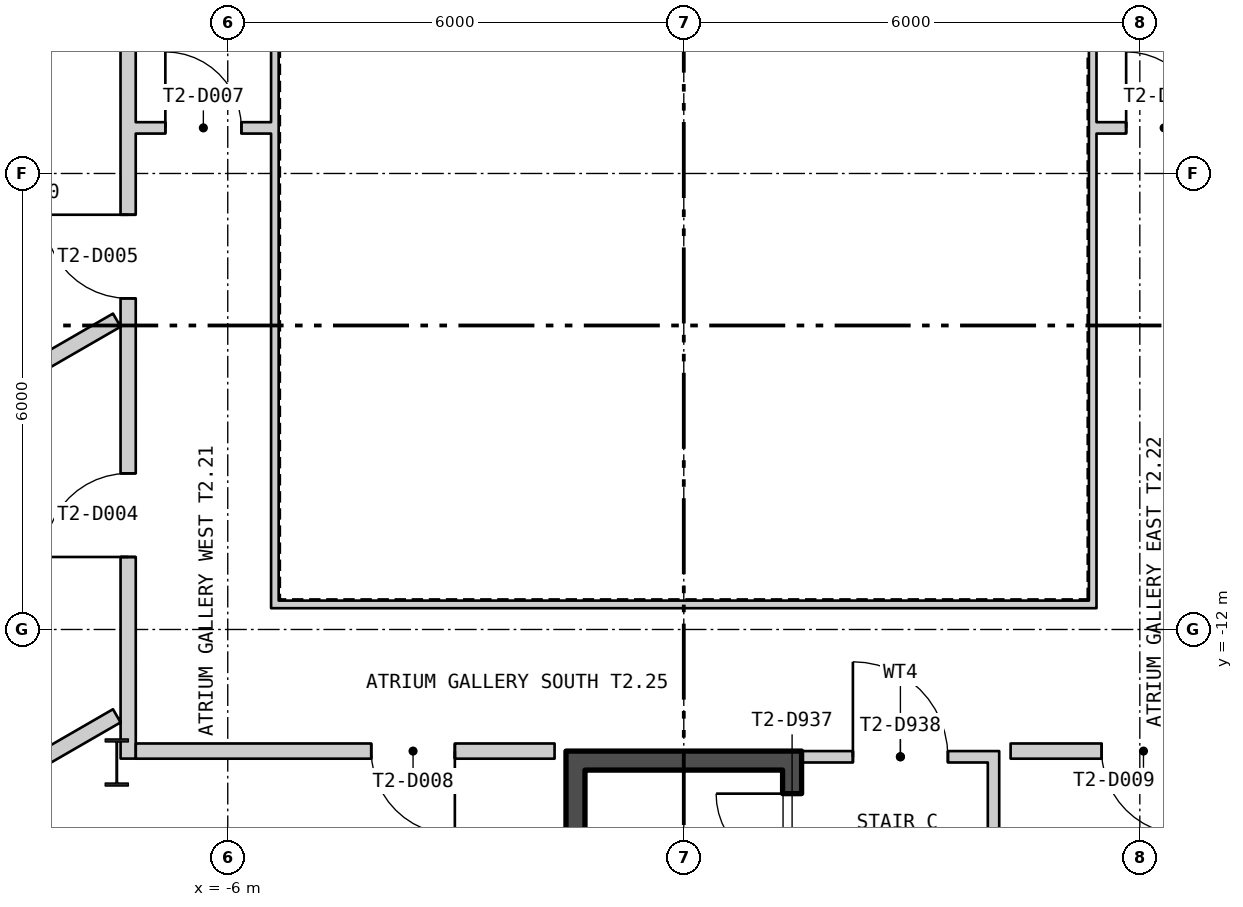
"""IFC4 building model, lengths in metres.
Left out: names, types, materials, properties, quantities, classifications, styles, units other than length and angle.
Written with IfcOpenShell. Run it as: python <this file> out.ifc"""

import sys

from ifc_helpers import new_model, si_unit, direction, frame, frame_2d, origin, origin_2d, place, context, subcontext, project, spatial, polyline, rectangle, i_section, outline, extrude, element, fill, save


model = new_model("IFC4")
c1 = context("Model", 3, precision=1e-05, world=origin(), true_north=direction((0.0, 1.0)))
c2 = subcontext(c1, "Body", "Model", "MODEL_VIEW")
j1 = project(units=[si_unit("LENGTHUNIT", "METRE"), si_unit("PLANEANGLEUNIT", "RADIAN")], contexts=[c1])
p1 = place(None, origin())
s1 = spatial("IfcSite", under=j1, at=p1, CompositionType="ELEMENT")
p2 = place(p1, origin())
s2 = spatial("IfcBuilding", under=s1, at=p2, CompositionType="ELEMENT")
p3 = place(p2, frame((0.0, 0.0, 133.8)))
s3 = spatial("IfcBuildingStorey", under=s2, at=p3, CompositionType="ELEMENT", Elevation=133.8)
p4 = place(p3, frame((-7.46, -13.75, 0.0), z_axis=(0.0, 0.0, 1.0), x_axis=(1.0, 0.0, 0.0)))
e1 = element("IfcColumn", 1, at=p4, inside=s3, PredefinedType="COLUMN", context=c2, shape_type="SweptSolid", body=[
    extrude(i_section(OverallWidth=0.305, OverallDepth=0.62, WebThickness=0.021, FlangeThickness=0.04, at=origin_2d()), origin(), (0.0, 0.0, 1.0), 6.0),
])
p5 = place(p3, frame((-27.365, 12.198, -0.18), z_axis=(0.0, 0.0, 1.0), x_axis=(0.500000335318, -0.866025210188, 0.0)))
e2 = element("IfcWall", 2, at=p5, inside=s3, PredefinedType="SOLIDWALL", context=c2, shape_type="SweptSolid", body=[
    extrude(outline(polyline([(-0.13, -0.225), (45.88, -0.225), (45.62, 0.225), (0.13, 0.225), (-0.13, -0.225)])), origin(), (0.0, 0.0, 1.0), 6.0),
])
p6 = place(p5, frame((1.425, 0.0, 1.38)))
e3 = element("IfcOpeningElement", 3, at=p6, cuts=e2, PredefinedType="OPENING", context=c2, shape_type="SweptSolid", body=[
    extrude(rectangle(XDim=2.4, YDim=3.6, at=frame_2d((1.2, 1.8))), frame((0.0, 0.235, 0.0), z_axis=(0.0, -1.0, 0.0), x_axis=(1.0, 0.0, 0.0)), (0.0, 0.0, 1.0), 0.47),
])
p7 = place(p5, frame((5.895, 0.0, 1.38)))
e4 = element("IfcOpeningElement", 4, at=p7, cuts=e2, PredefinedType="OPENING", context=c2, shape_type="SweptSolid", body=[
    extrude(rectangle(XDim=2.4, YDim=3.6, at=frame_2d((1.2, 1.8))), frame((0.0, 0.235, 0.0), z_axis=(0.0, -1.0, 0.0), x_axis=(1.0, 0.0, 0.0)), (0.0, 0.0, 1.0), 0.47),
])
p8 = place(p5, frame((10.403, 0.0, 1.38)))
e5 = element("IfcOpeningElement", 5, at=p8, cuts=e2, PredefinedType="OPENING", context=c2, shape_type="SweptSolid", body=[
    extrude(rectangle(XDim=2.4, YDim=3.6, at=frame_2d((1.2, 1.8))), frame((0.0, 0.235, 0.0), z_axis=(0.0, -1.0, 0.0), x_axis=(1.0, 0.0, 0.0)), (0.0, 0.0, 1.0), 0.47),
])
p9 = place(p5, frame((14.912, 0.0, 1.38)))
e6 = element("IfcOpeningElement", 6, at=p9, cuts=e2, PredefinedType="OPENING", context=c2, shape_type="SweptSolid", body=[
    extrude(rectangle(XDim=2.4, YDim=3.6, at=frame_2d((1.2, 1.8))), frame((0.0, 0.235, 0.0), z_axis=(0.0, -1.0, 0.0), x_axis=(1.0, 0.0, 0.0)), (0.0, 0.0, 1.0), 0.47),
])
p10 = place(p5, frame((19.421, 0.0, 1.38)))
e7 = element("IfcOpeningElement", 7, at=p10, cuts=e2, PredefinedType="OPENING", context=c2, shape_type="SweptSolid", body=[
    extrude(rectangle(XDim=2.4, YDim=3.6, at=frame_2d((1.2, 1.8))), frame((0.0, 0.235, 0.0), z_axis=(0.0, -1.0, 0.0), x_axis=(1.0, 0.0, 0.0)), (0.0, 0.0, 1.0), 0.47),
])
p11 = place(p5, frame((23.929, 0.0, 1.38)))
e8 = element("IfcOpeningElement", 8, at=p11, cuts=e2, PredefinedType="OPENING", context=c2, shape_type="SweptSolid", body=[
    extrude(rectangle(XDim=2.4, YDim=3.6, at=frame_2d((1.2, 1.8))), frame((0.0, 0.235, 0.0), z_axis=(0.0, -1.0, 0.0), x_axis=(1.0, 0.0, 0.0)), (0.0, 0.0, 1.0), 0.47),
])
p12 = place(p5, frame((28.438, 0.0, 1.38)))
e9 = element("IfcOpeningElement", 9, at=p12, cuts=e2, PredefinedType="OPENING", context=c2, shape_type="SweptSolid", body=[
    extrude(rectangle(XDim=2.4, YDim=3.6, at=frame_2d((1.2, 1.8))), frame((0.0, 0.235, 0.0), z_axis=(0.0, -1.0, 0.0), x_axis=(1.0, 0.0, 0.0)), (0.0, 0.0, 1.0), 0.47),
])
p13 = place(p5, frame((32.947, 0.0, 1.38)))
e10 = element("IfcOpeningElement", 10, at=p13, cuts=e2, PredefinedType="OPENING", context=c2, shape_type="SweptSolid", body=[
    extrude(rectangle(XDim=2.4, YDim=3.6, at=frame_2d((1.2, 1.8))), frame((0.0, 0.235, 0.0), z_axis=(0.0, -1.0, 0.0), x_axis=(1.0, 0.0, 0.0)), (0.0, 0.0, 1.0), 0.47),
])
p14 = place(p5, frame((37.455, 0.0, 1.38)))
e11 = element("IfcOpeningElement", 11, at=p14, cuts=e2, PredefinedType="OPENING", context=c2, shape_type="SweptSolid", body=[
    extrude(rectangle(XDim=2.4, YDim=3.6, at=frame_2d((1.2, 1.8))), frame((0.0, 0.235, 0.0), z_axis=(0.0, -1.0, 0.0), x_axis=(1.0, 0.0, 0.0)), (0.0, 0.0, 1.0), 0.47),
])
p15 = place(p5, frame((41.925, 0.0, 1.38)))
e12 = element("IfcOpeningElement", 12, at=p15, cuts=e2, PredefinedType="OPENING", context=c2, shape_type="SweptSolid", body=[
    extrude(rectangle(XDim=2.4, YDim=3.6, at=frame_2d((1.2, 1.8))), frame((0.0, 0.235, 0.0), z_axis=(0.0, -1.0, 0.0), x_axis=(1.0, 0.0, 0.0)), (0.0, 0.0, 1.0), 0.47),
])
p16 = place(p3, frame((4.49, -27.423, -0.18), z_axis=(0.0, 0.0, 1.0), x_axis=(0.500000335318, 0.866025210188, 0.0)))
e13 = element("IfcWall", 13, at=p16, inside=s3, PredefinedType="SOLIDWALL", context=c2, shape_type="SweptSolid", body=[
    extrude(outline(polyline([(-0.13, -0.225), (45.88, -0.225), (45.62, 0.225), (0.13, 0.225), (-0.13, -0.225)])), origin(), (0.0, 0.0, 1.0), 6.0),
])
p17 = place(p16, frame((1.425, 0.0, 1.38)))
e14 = element("IfcOpeningElement", 14, at=p17, cuts=e13, PredefinedType="OPENING", context=c2, shape_type="SweptSolid", body=[
    extrude(rectangle(XDim=2.4, YDim=3.6, at=frame_2d((1.2, 1.8))), frame((0.0, 0.235, 0.0), z_axis=(0.0, -1.0, 0.0), x_axis=(1.0, 0.0, 0.0)), (0.0, 0.0, 1.0), 0.47),
])
p18 = place(p16, frame((5.895, 0.0, 1.38)))
e15 = element("IfcOpeningElement", 15, at=p18, cuts=e13, PredefinedType="OPENING", context=c2, shape_type="SweptSolid", body=[
    extrude(rectangle(XDim=2.4, YDim=3.6, at=frame_2d((1.2, 1.8))), frame((0.0, 0.235, 0.0), z_axis=(0.0, -1.0, 0.0), x_axis=(1.0, 0.0, 0.0)), (0.0, 0.0, 1.0), 0.47),
])
p19 = place(p16, frame((10.403, 0.0, 1.38)))
e16 = element("IfcOpeningElement", 16, at=p19, cuts=e13, PredefinedType="OPENING", context=c2, shape_type="SweptSolid", body=[
    extrude(rectangle(XDim=2.4, YDim=3.6, at=frame_2d((1.2, 1.8))), frame((0.0, 0.235, 0.0), z_axis=(0.0, -1.0, 0.0), x_axis=(1.0, 0.0, 0.0)), (0.0, 0.0, 1.0), 0.47),
])
p20 = place(p16, frame((14.912, 0.0, 1.38)))
e17 = element("IfcOpeningElement", 17, at=p20, cuts=e13, PredefinedType="OPENING", context=c2, shape_type="SweptSolid", body=[
    extrude(rectangle(XDim=2.4, YDim=3.6, at=frame_2d((1.2, 1.8))), frame((0.0, 0.235, 0.0), z_axis=(0.0, -1.0, 0.0), x_axis=(1.0, 0.0, 0.0)), (0.0, 0.0, 1.0), 0.47),
])
p21 = place(p16, frame((19.421, 0.0, 1.38)))
e18 = element("IfcOpeningElement", 18, at=p21, cuts=e13, PredefinedType="OPENING", context=c2, shape_type="SweptSolid", body=[
    extrude(rectangle(XDim=2.4, YDim=3.6, at=frame_2d((1.2, 1.8))), frame((0.0, 0.235, 0.0), z_axis=(0.0, -1.0, 0.0), x_axis=(1.0, 0.0, 0.0)), (0.0, 0.0, 1.0), 0.47),
])
p22 = place(p16, frame((23.929, 0.0, 1.38)))
e19 = element("IfcOpeningElement", 19, at=p22, cuts=e13, PredefinedType="OPENING", context=c2, shape_type="SweptSolid", body=[
    extrude(rectangle(XDim=2.4, YDim=3.6, at=frame_2d((1.2, 1.8))), frame((0.0, 0.235, 0.0), z_axis=(0.0, -1.0, 0.0), x_axis=(1.0, 0.0, 0.0)), (0.0, 0.0, 1.0), 0.47),
])
p23 = place(p16, frame((28.438, 0.0, 1.38)))
e20 = element("IfcOpeningElement", 20, at=p23, cuts=e13, PredefinedType="OPENING", context=c2, shape_type="SweptSolid", body=[
    extrude(rectangle(XDim=2.4, YDim=3.6, at=frame_2d((1.2, 1.8))), frame((0.0, 0.235, 0.0), z_axis=(0.0, -1.0, 0.0), x_axis=(1.0, 0.0, 0.0)), (0.0, 0.0, 1.0), 0.47),
])
p24 = place(p16, frame((32.947, 0.0, 1.38)))
e21 = element("IfcOpeningElement", 21, at=p24, cuts=e13, PredefinedType="OPENING", context=c2, shape_type="SweptSolid", body=[
    extrude(rectangle(XDim=2.4, YDim=3.6, at=frame_2d((1.2, 1.8))), frame((0.0, 0.235, 0.0), z_axis=(0.0, -1.0, 0.0), x_axis=(1.0, 0.0, 0.0)), (0.0, 0.0, 1.0), 0.47),
])
p25 = place(p16, frame((37.455, 0.0, 1.38)))
e22 = element("IfcOpeningElement", 22, at=p25, cuts=e13, PredefinedType="OPENING", context=c2, shape_type="SweptSolid", body=[
    extrude(rectangle(XDim=2.4, YDim=3.6, at=frame_2d((1.2, 1.8))), frame((0.0, 0.235, 0.0), z_axis=(0.0, -1.0, 0.0), x_axis=(1.0, 0.0, 0.0)), (0.0, 0.0, 1.0), 0.47),
])
p26 = place(p16, frame((41.925, 0.0, 1.38)))
e23 = element("IfcOpeningElement", 23, at=p26, cuts=e13, PredefinedType="OPENING", context=c2, shape_type="SweptSolid", body=[
    extrude(rectangle(XDim=2.4, YDim=3.6, at=frame_2d((1.2, 1.8))), frame((0.0, 0.235, 0.0), z_axis=(0.0, -1.0, 0.0), x_axis=(1.0, 0.0, 0.0)), (0.0, 0.0, 1.0), 0.47),
])
p27 = place(p3, frame((-5.43, -11.67, 0.0), z_axis=(0.0, 0.0, 1.0), x_axis=(1.0, 0.0, 0.0)))
e24 = element("IfcWall", 24, at=p27, inside=s3, PredefinedType="PARTITIONING", context=c2, shape_type="SweptSolid", body=[
    extrude(rectangle(XDim=10.86, YDim=0.1, at=frame_2d((5.43, 0.0))), origin(), (0.0, 0.0, 1.0), 5.8),
])
for number, where, z_axis, x_axis in (
    (25, (5.38, -11.62, 0.0), (0.0, 0.0, 1.0), (0.0, 1.0, 0.0)),
    (26, (-5.38, -3.58, 0.0), (0.0, 0.0, 1.0), (0.0, -1.0, 0.0)),
):
    element("IfcWall", number, at=place(p3, frame(where, z_axis=z_axis, x_axis=x_axis)), inside=s3, PredefinedType="PARTITIONING", context=c2, shape_type="SweptSolid", body=[
        extrude(rectangle(XDim=8.04, YDim=0.1, at=frame_2d((4.02, 0.0))), origin(), (0.0, 0.0, 1.0), 5.8),
    ])
p28 = place(p3, frame((-1.425, -21.05, 0.0), z_axis=(0.0, 0.0, 1.0), x_axis=(0.0, 1.0, 0.0)))
e27 = element("IfcWall", 27, at=p28, inside=s3, PredefinedType="SHEAR", context=c2, shape_type="SweptSolid", body=[
    extrude(rectangle(XDim=7.2, YDim=0.25, at=frame_2d((3.6, 0.0))), origin(), (0.0, 0.0, 1.0), 5.8),
])
p29 = place(p3, frame((1.425, -21.05, 0.0), z_axis=(0.0, 0.0, 1.0), x_axis=(0.0, 1.0, 0.0)))
e28 = element("IfcWall", 28, at=p29, inside=s3, PredefinedType="SHEAR", context=c2, shape_type="SweptSolid", body=[
    extrude(rectangle(XDim=7.2, YDim=0.25, at=frame_2d((3.6, 0.0))), origin(), (0.0, 0.0, 1.0), 5.8),
])
p30 = place(p29, frame((5.89, 0.0, 0.0)))
e29 = element("IfcOpeningElement", 29, at=p30, cuts=e28, PredefinedType="OPENING", context=c2, shape_type="SweptSolid", body=[
    extrude(rectangle(XDim=1.0, YDim=2.1, at=frame_2d((0.5, 1.05))), frame((0.0, 0.135, 0.0), z_axis=(0.0, -1.0, 0.0), x_axis=(1.0, 0.0, 0.0)), (0.0, 0.0, 1.0), 0.27),
])
p31 = place(p3, frame((-1.55, -13.725, 0.0), z_axis=(0.0, 0.0, 1.0), x_axis=(1.0, 0.0, 0.0)))
e30 = element("IfcWall", 30, at=p31, inside=s3, PredefinedType="SHEAR", context=c2, shape_type="SweptSolid", body=[
    extrude(rectangle(XDim=3.1, YDim=0.25, at=frame_2d((1.55, 0.0))), origin(), (0.0, 0.0, 1.0), 5.8),
])
p32 = place(p3, frame((4.075, -16.15, 0.0), z_axis=(0.0, 0.0, 1.0), x_axis=(0.0, 1.0, 0.0)))
e31 = element("IfcWall", 31, at=p32, inside=s3, PredefinedType="PARTITIONING", context=c2, shape_type="SweptSolid", body=[
    extrude(rectangle(XDim=2.4, YDim=0.15, at=frame_2d((1.2, 0.0))), origin(), (0.0, 0.0, 1.0), 5.8),
])
p33 = place(p3, frame((1.55, -13.675, 0.0), z_axis=(0.0, 0.0, 1.0), x_axis=(1.0, 0.0, 0.0)))
e32 = element("IfcWall", 32, at=p33, inside=s3, PredefinedType="PARTITIONING", context=c2, shape_type="SweptSolid", body=[
    extrude(rectangle(XDim=2.6, YDim=0.15, at=frame_2d((1.3, 0.0))), origin(), (0.0, 0.0, 1.0), 4.89),
])
p34 = place(p33, frame((0.675, 0.0, 0.0)))
e33 = element("IfcOpeningElement", 33, at=p34, cuts=e32, PredefinedType="OPENING", context=c2, shape_type="SweptSolid", body=[
    extrude(rectangle(XDim=1.25, YDim=2.1, at=frame_2d((0.625, 1.05))), frame((0.0, 0.085, 0.0), z_axis=(0.0, -1.0, 0.0), x_axis=(1.0, 0.0, 0.0)), (0.0, 0.0, 1.0), 0.17),
])
p35 = place(p3, frame((-15.344, -7.274, 0.0), z_axis=(0.0, 0.0, 1.0), x_axis=(0.866037399706, 0.499979221878, 0.0)))
e34 = element("IfcWall", 34, at=p35, inside=s3, PredefinedType="PARTITIONING", context=c2, shape_type="SweptSolid", body=[
    extrude(rectangle(XDim=9.102, YDim=0.2, at=frame_2d((4.551, 0.0))), origin(), (0.0, 0.0, 1.0), 5.8),
])
p36 = place(p3, frame((-13.089, -11.179, 0.0), z_axis=(0.0, 0.0, 1.0), x_axis=(0.866085669847, 0.499895601587, 0.0)))
e35 = element("IfcWall", 35, at=p36, inside=s3, PredefinedType="PARTITIONING", context=c2, shape_type="SweptSolid", body=[
    extrude(rectangle(XDim=6.499, YDim=0.2, at=frame_2d((3.25, 0.0))), origin(), (0.0, 0.0, 1.0), 5.8),
])
p37 = place(p3, frame((-10.834, -15.084, 0.0), z_axis=(0.0, 0.0, 1.0), x_axis=(0.866023159588, 0.500003887042, 0.0)))
e36 = element("IfcWall", 36, at=p37, inside=s3, PredefinedType="PARTITIONING", context=c2, shape_type="SweptSolid", body=[
    extrude(rectangle(XDim=3.896, YDim=0.2, at=frame_2d((1.948, 0.0))), origin(), (0.0, 0.0, 1.0), 5.8),
])
p38 = place(p3, frame((-7.31, -13.699, 0.0), z_axis=(0.0, 0.0, 1.0), x_axis=(-8.5722449e-05, 0.999999996326, 0.0)))
e37 = element("IfcWall", 37, at=p38, inside=s3, PredefinedType="PARTITIONING", context=c2, shape_type="SweptSolid", body=[
    extrude(rectangle(XDim=10.499, YDim=0.2, at=frame_2d((5.25, 0.0))), origin(), (0.0, 0.0, 1.0), 5.21),
])
p39 = place(p38, frame((2.653, 0.0, 0.0)))
e38 = element("IfcOpeningElement", 38, at=p39, cuts=e37, PredefinedType="OPENING", context=c2, shape_type="SweptSolid", body=[
    extrude(rectangle(XDim=1.1, YDim=2.1, at=frame_2d((0.55, 1.05))), frame((0.0, 0.11, 0.0), z_axis=(0.0, -1.0, 0.0), x_axis=(1.0, 0.0, 0.0)), (0.0, 0.0, 1.0), 0.22),
])
p40 = place(p38, frame((6.056, 0.0, 0.0)))
e39 = element("IfcOpeningElement", 39, at=p40, cuts=e37, PredefinedType="OPENING", context=c2, shape_type="SweptSolid", body=[
    extrude(rectangle(XDim=1.1, YDim=2.1, at=frame_2d((0.55, 1.05))), frame((0.0, 0.11, 0.0), z_axis=(0.0, -1.0, 0.0), x_axis=(1.0, 0.0, 0.0)), (0.0, 0.0, 1.0), 0.22),
])
p41 = place(p3, frame((-7.211, -5.4, 0.0), z_axis=(0.0, 0.0, 1.0), x_axis=(1.0, 0.0, 0.0)))
e40 = element("IfcWall", 40, at=p41, inside=s3, PredefinedType="PARTITIONING", context=c2, shape_type="SweptSolid", body=[
    extrude(rectangle(XDim=1.781, YDim=0.15, at=frame_2d((0.89, 0.0))), origin(), (0.0, 0.0, 1.0), 5.8),
])
p42 = place(p41, frame((0.39, 0.0, 0.0)))
e41 = element("IfcOpeningElement", 41, at=p42, cuts=e40, PredefinedType="OPENING", context=c2, shape_type="SweptSolid", body=[
    extrude(rectangle(XDim=1.0, YDim=2.1, at=frame_2d((0.5, 1.05))), frame((0.0, 0.085, 0.0), z_axis=(0.0, -1.0, 0.0), x_axis=(1.0, 0.0, 0.0)), (0.0, 0.0, 1.0), 0.17),
])
p43 = place(p3, frame((-7.21, -13.6, 0.0), z_axis=(0.0, 0.0, 1.0), x_axis=(1.0, 0.0, 0.0)))
e42 = element("IfcWall", 42, at=p43, inside=s3, PredefinedType="PARTITIONING", context=c2, shape_type="SweptSolid", body=[
    extrude(rectangle(XDim=5.51, YDim=0.2, at=frame_2d((2.755, 0.0))), origin(), (0.0, 0.0, 1.0), 4.89),
])
p44 = place(p43, frame((3.098, 0.0, 0.0)))
e43 = element("IfcOpeningElement", 43, at=p44, cuts=e42, PredefinedType="OPENING", context=c2, shape_type="SweptSolid", body=[
    extrude(rectangle(XDim=1.1, YDim=2.1, at=frame_2d((0.55, 1.05))), frame((0.0, 0.11, 0.0), z_axis=(0.0, -1.0, 0.0), x_axis=(1.0, 0.0, 0.0)), (0.0, 0.0, 1.0), 0.22),
])
p45 = place(p3, frame((4.3, -13.6, 0.0), z_axis=(0.0, 0.0, 1.0), x_axis=(1.0, 0.0, 0.0)))
e44 = element("IfcWall", 44, at=p45, inside=s3, PredefinedType="PARTITIONING", context=c2, shape_type="SweptSolid", body=[
    extrude(rectangle(XDim=3.109, YDim=0.2, at=frame_2d((1.554, 0.0))), origin(), (0.0, 0.0, 1.0), 4.89),
])
p46 = place(p45, frame((1.198, 0.0, 0.0)))
e45 = element("IfcOpeningElement", 45, at=p46, cuts=e44, PredefinedType="OPENING", context=c2, shape_type="SweptSolid", body=[
    extrude(rectangle(XDim=1.1, YDim=2.1, at=frame_2d((0.55, 1.05))), frame((0.0, 0.11, 0.0), z_axis=(0.0, -1.0, 0.0), x_axis=(1.0, 0.0, 0.0)), (0.0, 0.0, 1.0), 0.22),
])
p47 = place(p3, frame((5.43, -5.4, 0.0), z_axis=(0.0, 0.0, 1.0), x_axis=(1.0, 0.0, 0.0)))
e46 = element("IfcWall", 46, at=p47, inside=s3, PredefinedType="PARTITIONING", context=c2, shape_type="SweptSolid", body=[
    extrude(rectangle(XDim=1.78, YDim=0.15, at=frame_2d((0.89, 0.0))), origin(), (0.0, 0.0, 1.0), 5.8),
])
p48 = place(p47, frame((0.39, 0.0, 0.0)))
e47 = element("IfcOpeningElement", 47, at=p48, cuts=e46, PredefinedType="OPENING", context=c2, shape_type="SweptSolid", body=[
    extrude(rectangle(XDim=1.0, YDim=2.1, at=frame_2d((0.5, 1.05))), frame((0.0, 0.085, 0.0), z_axis=(0.0, -1.0, 0.0), x_axis=(1.0, 0.0, 0.0)), (0.0, 0.0, 1.0), 0.17),
])
p49 = place(p30, origin())
e48 = element("IfcDoor", 48, at=p49, inside=s3, OperationType="SINGLE_SWING_LEFT", PredefinedType="DOOR", context=c2, shape_type="SweptSolid", body=[
    extrude(rectangle(XDim=1.0, YDim=2.1, at=frame_2d((0.5, 1.05))), frame((0.0, 0.025, 0.0), z_axis=(0.0, -1.0, 0.0), x_axis=(1.0, 0.0, 0.0)), (0.0, 0.0, 1.0), 0.05),
])
fill(e29, e48)
p50 = place(p34, origin())
e49 = element("IfcDoor", 49, at=p50, inside=s3, OperationType="SINGLE_SWING_RIGHT", PredefinedType="DOOR", context=c2, shape_type="SweptSolid", body=[
    extrude(rectangle(XDim=1.25, YDim=2.1, at=frame_2d((0.625, 1.05))), frame((0.0, 0.025, 0.0), z_axis=(0.0, -1.0, 0.0), x_axis=(1.0, 0.0, 0.0)), (0.0, 0.0, 1.0), 0.05),
])
fill(e33, e49)
p51 = place(p39, origin())
e50 = element("IfcDoor", 50, at=p51, inside=s3, OperationType="SINGLE_SWING_RIGHT", PredefinedType="DOOR", context=c2, shape_type="SweptSolid", body=[
    extrude(rectangle(XDim=1.1, YDim=2.1, at=frame_2d((0.55, 1.05))), frame((0.0, 0.025, 0.0), z_axis=(0.0, -1.0, 0.0), x_axis=(1.0, 0.0, 0.0)), (0.0, 0.0, 1.0), 0.05),
])
fill(e38, e50)
p52 = place(p40, origin())
e51 = element("IfcDoor", 51, at=p52, inside=s3, OperationType="SINGLE_SWING_LEFT", PredefinedType="DOOR", context=c2, shape_type="SweptSolid", body=[
    extrude(rectangle(XDim=1.1, YDim=2.1, at=frame_2d((0.55, 1.05))), frame((0.0, 0.025, 0.0), z_axis=(0.0, -1.0, 0.0), x_axis=(1.0, 0.0, 0.0)), (0.0, 0.0, 1.0), 0.05),
])
fill(e39, e51)
p53 = place(p42, origin())
e52 = element("IfcDoor", 52, at=p53, inside=s3, OperationType="SINGLE_SWING_RIGHT", PredefinedType="DOOR", context=c2, shape_type="SweptSolid", body=[
    extrude(rectangle(XDim=1.0, YDim=2.1, at=frame_2d((0.5, 1.05))), frame((0.0, 0.025, 0.0), z_axis=(0.0, -1.0, 0.0), x_axis=(1.0, 0.0, 0.0)), (0.0, 0.0, 1.0), 0.05),
])
fill(e41, e52)
p54 = place(p44, origin())
e53 = element("IfcDoor", 53, at=p54, inside=s3, OperationType="SINGLE_SWING_RIGHT", PredefinedType="DOOR", context=c2, shape_type="SweptSolid", body=[
    extrude(rectangle(XDim=1.1, YDim=2.1, at=frame_2d((0.55, 1.05))), frame((0.0, 0.025, 0.0), z_axis=(0.0, -1.0, 0.0), x_axis=(1.0, 0.0, 0.0)), (0.0, 0.0, 1.0), 0.05),
])
fill(e43, e53)
p55 = place(p46, origin())
e54 = element("IfcDoor", 54, at=p55, inside=s3, OperationType="SINGLE_SWING_RIGHT", PredefinedType="DOOR", context=c2, shape_type="SweptSolid", body=[
    extrude(rectangle(XDim=1.1, YDim=2.1, at=frame_2d((0.55, 1.05))), frame((0.0, 0.025, 0.0), z_axis=(0.0, -1.0, 0.0), x_axis=(1.0, 0.0, 0.0)), (0.0, 0.0, 1.0), 0.05),
])
fill(e45, e54)
p56 = place(p48, origin())
e55 = element("IfcDoor", 55, at=p56, inside=s3, OperationType="SINGLE_SWING_RIGHT", PredefinedType="DOOR", context=c2, shape_type="SweptSolid", body=[
    extrude(rectangle(XDim=1.0, YDim=2.1, at=frame_2d((0.5, 1.05))), frame((0.0, 0.025, 0.0), z_axis=(0.0, -1.0, 0.0), x_axis=(1.0, 0.0, 0.0)), (0.0, 0.0, 1.0), 0.05),
])
fill(e47, e55)
save(model, sys.argv[1])
